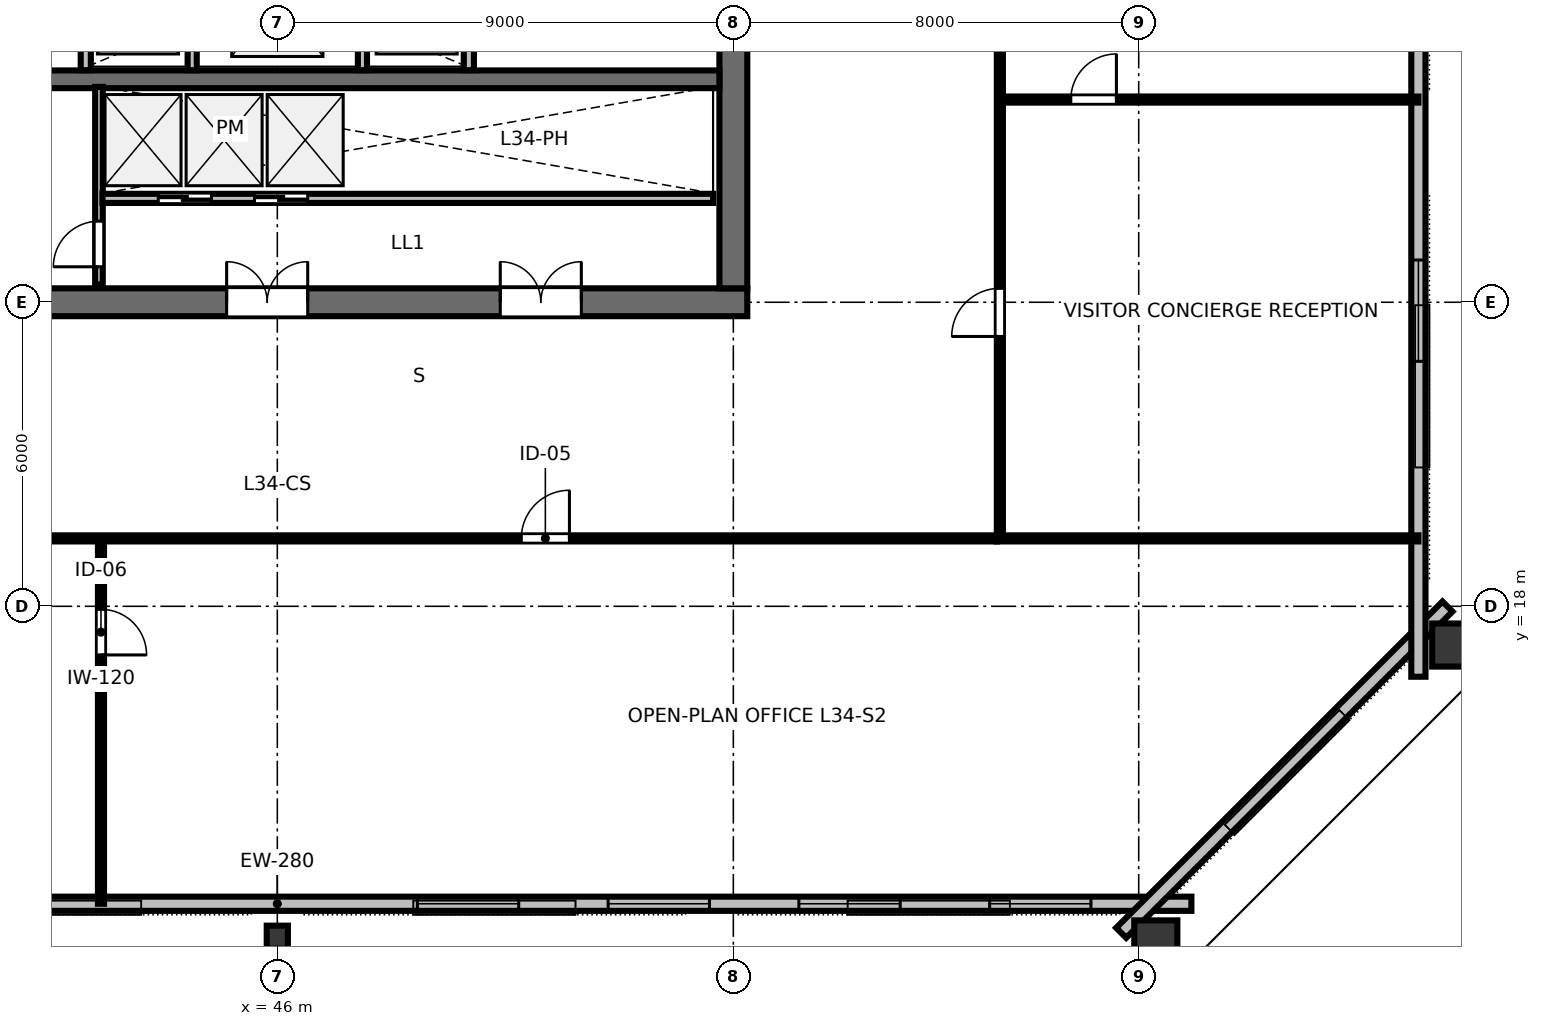
"""IFC4 building model, lengths in metres.
Left out: names, types, materials, properties, quantities, classifications, styles, units other than length and angle.
Written with IfcOpenShell. Run it as: python <this file> out.ifc"""

import sys

from ifc_helpers import new_model, si_unit, direction, frame, frame_2d, origin, origin_2d, place, context, subcontext, project, spatial, rectangle, hollow_rectangle, i_section, extrude, element, fill, save


model = new_model("IFC4")
c1 = context("Model", 3, precision=1e-05, world=origin(), true_north=direction((0.0, 1.0)))
c2 = subcontext(c1, "Body", "Model", "MODEL_VIEW")
j1 = project(units=[si_unit("LENGTHUNIT", "METRE"), si_unit("PLANEANGLEUNIT", "RADIAN")], contexts=[c1])
p1 = place(None, origin())
s1 = spatial("IfcSite", under=j1, at=p1, CompositionType="ELEMENT")
p2 = place(p1, origin())
s2 = spatial("IfcBuilding", under=s1, at=p2, CompositionType="ELEMENT")
p3 = place(p2, frame((0.0, 0.0, 131.2)))
s3 = spatial("IfcBuildingStorey", under=s2, at=p3, CompositionType="ELEMENT", Elevation=131.2)
p4 = place(p3, frame((36.725, 24.0, 0.0), z_axis=(0.0, 0.0, 1.0), x_axis=(1.0, 0.0, 0.0)))
e1 = element("IfcWall", 1, at=p4, inside=s3, PredefinedType="SHEAR", context=c2, shape_type="SweptSolid", body=[
    extrude(rectangle(XDim=18.55, YDim=0.55, at=frame_2d((9.275, 0.0))), origin(), (0.0, 0.0, 1.0), 3.36),
])
p5 = place(p4, frame((8.275, 0.0, 0.0)))
e2 = element("IfcOpeningElement", 2, at=p5, cuts=e1, PredefinedType="OPENING", context=c2, shape_type="SweptSolid", body=[
    extrude(rectangle(XDim=1.6, YDim=2.15, at=frame_2d((0.8, 1.075))), frame((0.0, 0.285, 0.0), z_axis=(0.0, -1.0, 0.0), x_axis=(1.0, 0.0, 0.0)), (0.0, 0.0, 1.0), 0.57),
])
p6 = place(p4, frame((13.675, 0.0, 0.0)))
e3 = element("IfcOpeningElement", 3, at=p6, cuts=e1, PredefinedType="OPENING", context=c2, shape_type="SweptSolid", body=[
    extrude(rectangle(XDim=1.6, YDim=2.15, at=frame_2d((0.8, 1.075))), frame((0.0, 0.285, 0.0), z_axis=(0.0, -1.0, 0.0), x_axis=(1.0, 0.0, 0.0)), (0.0, 0.0, 1.0), 0.57),
])
p7 = place(p3, frame((55.0, 24.275, 0.0), z_axis=(0.0, 0.0, 1.0), x_axis=(0.0, 1.0, 0.0)))
e4 = element("IfcWall", 4, at=p7, inside=s3, PredefinedType="SHEAR", context=c2, shape_type="SweptSolid", body=[
    extrude(rectangle(XDim=15.45, YDim=0.55, at=frame_2d((7.725, 0.0))), origin(), (0.0, 0.0, 1.0), 3.36),
])
p8 = place(p7, frame((5.25, 0.0, 0.0)))
e5 = element("IfcOpeningElement", 5, at=p8, cuts=e4, PredefinedType="OPENING", context=c2, shape_type="SweptSolid", body=[
    extrude(rectangle(XDim=1.15, YDim=2.15, at=frame_2d((0.575, 1.075))), frame((0.0, 0.285, 0.0), z_axis=(0.0, -1.0, 0.0), x_axis=(1.0, 0.0, 0.0)), (0.0, 0.0, 1.0), 0.57),
])
p9 = place(p3, frame((37.275, 28.4, 0.0), z_axis=(0.0, 0.0, 1.0), x_axis=(1.0, 0.0, 0.0)))
e6 = element("IfcWall", 6, at=p9, inside=s3, PredefinedType="SHEAR", context=c2, shape_type="SweptSolid", body=[
    extrude(rectangle(XDim=17.45, YDim=0.35, at=frame_2d((8.725, 0.0))), origin(), (0.0, 0.0, 1.0), 3.36),
])
p10 = place(p3, frame((46.0, 11.47, 0.0), z_axis=(0.0, 0.0, 1.0), x_axis=(1.0, 0.0, 0.0)))
e7 = element("IfcColumn", 7, at=p10, inside=s3, PredefinedType="COLUMN", context=c2, shape_type="SweptSolid", body=[
    extrude(i_section(OverallWidth=0.418, OverallDepth=0.455, WebThickness=0.042, FlangeThickness=0.068, FilletRadius=0.025, at=origin_2d()), origin(), (0.0, 0.0, 1.0), 3.358),
])
for number, where, z_axis, x_axis in (
    (8, (63.338, 11.302, 0.0), (0.0, 0.0, 1.0), (1.0, 0.0, 0.0)),
    (9, (69.292, 17.236, 0.0), (0.0, 0.0, 1.0), (0.0, 1.0, 0.0)),
):
    element("IfcColumn", number, at=place(p3, frame(where, z_axis=z_axis, x_axis=x_axis)), inside=s3, PredefinedType="COLUMN", context=c2, shape_type="SweptSolid", body=[
        extrude(hollow_rectangle(XDim=0.85, YDim=1.0, WallThickness=0.05, at=origin_2d()), origin(), (0.0, 0.0, 1.0), 3.358),
    ])
p11 = place(p3, frame((27.96, 12.13, 0.0), z_axis=(0.0, 0.0, 1.0), x_axis=(1.0, 0.0, 0.0)))
e10 = element("IfcWall", 10, at=p11, inside=s3, PredefinedType="STANDARD", context=c2, shape_type="SweptSolid", body=[
    extrude(rectangle(XDim=36.08, YDim=0.28, at=frame_2d((18.04, 0.0))), origin(), (0.0, 0.0, 1.0), 3.36),
])
p12 = place(p11, frame((1.982, 0.0, 0.8)))
e11 = element("IfcOpeningElement", 11, at=p12, cuts=e10, PredefinedType="OPENING", context=c2, shape_type="SweptSolid", body=[
    extrude(rectangle(XDim=2.0, YDim=1.95, at=frame_2d((1.0, 0.975))), frame((0.0, 0.15, 0.0), z_axis=(0.0, -1.0, 0.0), x_axis=(1.0, 0.0, 0.0)), (0.0, 0.0, 1.0), 0.3),
])
p13 = place(p11, frame((5.747, 0.0, 0.8)))
e12 = element("IfcOpeningElement", 12, at=p13, cuts=e10, PredefinedType="OPENING", context=c2, shape_type="SweptSolid", body=[
    extrude(rectangle(XDim=2.0, YDim=1.95, at=frame_2d((1.0, 0.975))), frame((0.0, 0.15, 0.0), z_axis=(0.0, -1.0, 0.0), x_axis=(1.0, 0.0, 0.0)), (0.0, 0.0, 1.0), 0.3),
])
p14 = place(p11, frame((9.511, 0.0, 0.8)))
e13 = element("IfcOpeningElement", 13, at=p14, cuts=e10, PredefinedType="OPENING", context=c2, shape_type="SweptSolid", body=[
    extrude(rectangle(XDim=2.0, YDim=1.95, at=frame_2d((1.0, 0.975))), frame((0.0, 0.15, 0.0), z_axis=(0.0, -1.0, 0.0), x_axis=(1.0, 0.0, 0.0)), (0.0, 0.0, 1.0), 0.3),
])
p15 = place(p11, frame((20.804, 0.0, 0.8)))
e14 = element("IfcOpeningElement", 14, at=p15, cuts=e10, PredefinedType="OPENING", context=c2, shape_type="SweptSolid", body=[
    extrude(rectangle(XDim=2.0, YDim=1.95, at=frame_2d((1.0, 0.975))), frame((0.0, 0.15, 0.0), z_axis=(0.0, -1.0, 0.0), x_axis=(1.0, 0.0, 0.0)), (0.0, 0.0, 1.0), 0.3),
])
p16 = place(p11, frame((24.569, 0.0, 0.8)))
e15 = element("IfcOpeningElement", 15, at=p16, cuts=e10, PredefinedType="OPENING", context=c2, shape_type="SweptSolid", body=[
    extrude(rectangle(XDim=2.0, YDim=1.95, at=frame_2d((1.0, 0.975))), frame((0.0, 0.15, 0.0), z_axis=(0.0, -1.0, 0.0), x_axis=(1.0, 0.0, 0.0)), (0.0, 0.0, 1.0), 0.3),
])
p17 = place(p11, frame((28.333, 0.0, 0.8)))
e16 = element("IfcOpeningElement", 16, at=p17, cuts=e10, PredefinedType="OPENING", context=c2, shape_type="SweptSolid", body=[
    extrude(rectangle(XDim=2.0, YDim=1.95, at=frame_2d((1.0, 0.975))), frame((0.0, 0.15, 0.0), z_axis=(0.0, -1.0, 0.0), x_axis=(1.0, 0.0, 0.0)), (0.0, 0.0, 1.0), 0.3),
])
p18 = place(p11, frame((32.098, 0.0, 0.8)))
e17 = element("IfcOpeningElement", 17, at=p18, cuts=e10, PredefinedType="OPENING", context=c2, shape_type="SweptSolid", body=[
    extrude(rectangle(XDim=2.0, YDim=1.95, at=frame_2d((1.0, 0.975))), frame((0.0, 0.15, 0.0), z_axis=(0.0, -1.0, 0.0), x_axis=(1.0, 0.0, 0.0)), (0.0, 0.0, 1.0), 0.3),
])
p19 = place(p3, frame((62.655, 11.556, 0.0), z_axis=(0.0, 0.0, 1.0), x_axis=(0.707106781187, 0.707106781187, 0.0)))
e18 = element("IfcWall", 18, at=p19, inside=s3, PredefinedType="STANDARD", context=c2, shape_type="SweptSolid", body=[
    extrude(rectangle(XDim=9.107, YDim=0.28, at=frame_2d((4.553, 0.0))), origin(), (0.0, 0.0, 1.0), 3.36),
])
p20 = place(p3, frame((68.52, 16.61, 0.0), z_axis=(0.0, 0.0, 1.0), x_axis=(0.0, 1.0, 0.0)))
e19 = element("IfcWall", 19, at=p20, inside=s3, PredefinedType="STANDARD", context=c2, shape_type="SweptSolid", body=[
    extrude(rectangle(XDim=30.78, YDim=0.28, at=frame_2d((15.39, 0.0))), origin(), (0.0, 0.0, 1.0), 3.36),
])
p21 = place(p20, frame((6.224, 0.0, 0.8)))
e20 = element("IfcOpeningElement", 20, at=p21, cuts=e19, PredefinedType="OPENING", context=c2, shape_type="SweptSolid", body=[
    extrude(rectangle(XDim=2.0, YDim=1.95, at=frame_2d((1.0, 0.975))), frame((0.0, 0.15, 0.0), z_axis=(0.0, -1.0, 0.0), x_axis=(1.0, 0.0, 0.0)), (0.0, 0.0, 1.0), 0.3),
])
p22 = place(p20, frame((18.473, 0.0, 0.8)))
e21 = element("IfcOpeningElement", 21, at=p22, cuts=e19, PredefinedType="OPENING", context=c2, shape_type="SweptSolid", body=[
    extrude(rectangle(XDim=2.0, YDim=1.95, at=frame_2d((1.0, 0.975))), frame((0.0, 0.15, 0.0), z_axis=(0.0, -1.0, 0.0), x_axis=(1.0, 0.0, 0.0)), (0.0, 0.0, 1.0), 0.3),
])
p23 = place(p20, frame((22.556, 0.0, 0.8)))
e22 = element("IfcOpeningElement", 22, at=p23, cuts=e19, PredefinedType="OPENING", context=c2, shape_type="SweptSolid", body=[
    extrude(rectangle(XDim=2.0, YDim=1.95, at=frame_2d((1.0, 0.975))), frame((0.0, 0.15, 0.0), z_axis=(0.0, -1.0, 0.0), x_axis=(1.0, 0.0, 0.0)), (0.0, 0.0, 1.0), 0.3),
])
p24 = place(p3, frame((42.22, 28.58, 0.0), z_axis=(0.0, 0.0, 1.0), x_axis=(0.0, 1.0, 0.0)))
e23 = element("IfcWall", 23, at=p24, inside=s3, PredefinedType="PARTITIONING", context=c2, shape_type="SweptSolid", body=[
    extrude(rectangle(XDim=3.04, YDim=0.2, at=frame_2d((1.52, 0.0))), origin(), (0.0, 0.0, 1.0), 3.36),
])
p25 = place(p24, frame((0.95, 0.0, 0.0)))
e24 = element("IfcOpeningElement", 24, at=p25, cuts=e23, PredefinedType="OPENING", context=c2, shape_type="SweptSolid", body=[
    extrude(rectangle(XDim=1.05, YDim=2.15, at=frame_2d((0.525, 1.075))), frame((0.0, 0.11, 0.0), z_axis=(0.0, -1.0, 0.0), x_axis=(1.0, 0.0, 0.0)), (0.0, 0.0, 1.0), 0.22),
])
p26 = place(p3, frame((49.78, 28.58, 0.0), z_axis=(0.0, 0.0, 1.0), x_axis=(0.0, 1.0, 0.0)))
e25 = element("IfcWall", 25, at=p26, inside=s3, PredefinedType="PARTITIONING", context=c2, shape_type="SweptSolid", body=[
    extrude(rectangle(XDim=3.04, YDim=0.2, at=frame_2d((1.52, 0.0))), origin(), (0.0, 0.0, 1.0), 3.36),
])
p27 = place(p26, frame((0.95, 0.0, 0.0)))
e26 = element("IfcOpeningElement", 26, at=p27, cuts=e25, PredefinedType="OPENING", context=c2, shape_type="SweptSolid", body=[
    extrude(rectangle(XDim=1.05, YDim=2.15, at=frame_2d((0.525, 1.075))), frame((0.0, 0.11, 0.0), z_axis=(0.0, -1.0, 0.0), x_axis=(1.0, 0.0, 0.0)), (0.0, 0.0, 1.0), 0.22),
])
for number, where, z_axis, x_axis in (
    (27, (44.32, 28.58, 0.0), (0.0, 0.0, 1.0), (0.0, 1.0, 0.0)),
    (28, (47.68, 28.58, 0.0), (0.0, 0.0, 1.0), (0.0, 1.0, 0.0)),
):
    element("IfcWall", number, at=place(p3, frame(where, z_axis=z_axis, x_axis=x_axis)), inside=s3, PredefinedType="PARTITIONING", context=c2, shape_type="SweptSolid", body=[
        extrude(rectangle(XDim=3.04, YDim=0.18, at=frame_2d((1.52, 0.0))), origin(), (0.0, 0.0, 1.0), 3.36),
    ])
p28 = place(p3, frame((42.48, 24.35, 0.0), z_axis=(0.0, 0.0, 1.0), x_axis=(0.0, 1.0, 0.0)))
e29 = element("IfcWall", 29, at=p28, inside=s3, PredefinedType="PARTITIONING", context=c2, shape_type="SweptSolid", body=[
    extrude(rectangle(XDim=3.9, YDim=0.15, at=frame_2d((1.95, 0.0))), origin(), (0.0, 0.0, 1.0), 3.36),
])
p29 = place(p28, frame((0.35, 0.0, 0.0)))
e30 = element("IfcOpeningElement", 30, at=p29, cuts=e29, PredefinedType="OPENING", context=c2, shape_type="SweptSolid", body=[
    extrude(rectangle(XDim=0.9, YDim=2.15, at=frame_2d((0.45, 1.075))), frame((0.0, 0.085, 0.0), z_axis=(0.0, -1.0, 0.0), x_axis=(1.0, 0.0, 0.0)), (0.0, 0.0, 1.0), 0.17),
])
p30 = place(p3, frame((42.55, 26.05, 0.0), z_axis=(0.0, 0.0, 1.0), x_axis=(1.0, 0.0, 0.0)))
e31 = element("IfcWall", 31, at=p30, inside=s3, PredefinedType="PARTITIONING", context=c2, shape_type="SweptSolid", body=[
    extrude(rectangle(XDim=12.05, YDim=0.18, at=frame_2d((6.025, 0.0))), origin(), (0.0, 0.0, 1.0), 3.36),
])
p31 = place(p30, frame((1.1, 0.0, 0.0)))
e32 = element("IfcOpeningElement", 32, at=p31, cuts=e31, PredefinedType="OPENING", context=c2, shape_type="SweptSolid", body=[
    extrude(rectangle(XDim=1.05, YDim=2.15, at=frame_2d((0.525, 1.075))), frame((0.0, 0.1, 0.0), z_axis=(0.0, -1.0, 0.0), x_axis=(1.0, 0.0, 0.0)), (0.0, 0.0, 1.0), 0.2),
])
p32 = place(p30, frame((3.0, 0.0, 0.0)))
e33 = element("IfcOpeningElement", 33, at=p32, cuts=e31, PredefinedType="OPENING", context=c2, shape_type="SweptSolid", body=[
    extrude(rectangle(XDim=1.05, YDim=2.15, at=frame_2d((0.525, 1.075))), frame((0.0, 0.1, 0.0), z_axis=(0.0, -1.0, 0.0), x_axis=(1.0, 0.0, 0.0)), (0.0, 0.0, 1.0), 0.2),
])
p33 = place(p3, frame((42.52, 19.34, 0.0), z_axis=(0.0, 0.0, 1.0), x_axis=(0.0, -1.0, 0.0)))
e34 = element("IfcWall", 34, at=p33, inside=s3, PredefinedType="PARTITIONING", context=c2, shape_type="SweptSolid", body=[
    extrude(rectangle(XDim=7.21, YDim=0.12, at=frame_2d((3.605, 0.0))), origin(), (0.0, 0.0, 1.0), 2.64),
])
p34 = place(p33, frame((1.4, 0.0, 0.0)))
e35 = element("IfcOpeningElement", 35, at=p34, cuts=e34, PredefinedType="OPENING", context=c2, shape_type="SweptSolid", body=[
    extrude(rectangle(XDim=0.9, YDim=2.15, at=frame_2d((0.45, 1.075))), frame((0.0, 0.07, 0.0), z_axis=(0.0, -1.0, 0.0), x_axis=(1.0, 0.0, 0.0)), (0.0, 0.0, 1.0), 0.14),
])
p35 = place(p3, frame((31.8, 19.34, 0.0), z_axis=(0.0, 0.0, 1.0), x_axis=(1.0, 0.0, 0.0)))
e36 = element("IfcWall", 36, at=p35, inside=s3, PredefinedType="PARTITIONING", context=c2, shape_type="SweptSolid", body=[
    extrude(rectangle(XDim=28.4, YDim=0.12, at=frame_2d((14.2, 0.0))), origin(), (0.0, 0.0, 1.0), 2.64),
])
p36 = place(p35, frame((4.955, 0.0, 0.0)))
e37 = element("IfcOpeningElement", 37, at=p36, cuts=e36, PredefinedType="OPENING", context=c2, shape_type="SweptSolid", body=[
    extrude(rectangle(XDim=0.95, YDim=2.15, at=frame_2d((0.475, 1.075))), frame((0.0, 0.07, 0.0), z_axis=(0.0, -1.0, 0.0), x_axis=(1.0, 0.0, 0.0)), (0.0, 0.0, 1.0), 0.14),
])
p37 = place(p35, frame((19.015, 0.0, 0.0)))
e38 = element("IfcOpeningElement", 38, at=p37, cuts=e36, PredefinedType="OPENING", context=c2, shape_type="SweptSolid", body=[
    extrude(rectangle(XDim=0.95, YDim=2.15, at=frame_2d((0.475, 1.075))), frame((0.0, 0.07, 0.0), z_axis=(0.0, -1.0, 0.0), x_axis=(1.0, 0.0, 0.0)), (0.0, 0.0, 1.0), 0.14),
])
p38 = place(p3, frame((60.26, 28.0, 0.0), z_axis=(0.0, 0.0, 1.0), x_axis=(1.0, 0.0, 0.0)))
e39 = element("IfcWall", 39, at=p38, inside=s3, PredefinedType="PARTITIONING", context=c2, shape_type="SweptSolid", body=[
    extrude(rectangle(XDim=8.26, YDim=0.12, at=frame_2d((4.13, 0.0))), origin(), (0.0, 0.0, 1.0), 2.64),
])
p39 = place(p38, frame((1.4, 0.0, 0.0)))
e40 = element("IfcOpeningElement", 40, at=p39, cuts=e39, PredefinedType="OPENING", context=c2, shape_type="SweptSolid", body=[
    extrude(rectangle(XDim=0.9, YDim=2.15, at=frame_2d((0.45, 1.075))), frame((0.0, 0.07, 0.0), z_axis=(0.0, -1.0, 0.0), x_axis=(1.0, 0.0, 0.0)), (0.0, 0.0, 1.0), 0.14),
])
p40 = place(p3, frame((60.26, 19.4, 0.0), z_axis=(0.0, 0.0, 1.0), x_axis=(0.0, 1.0, 0.0)))
e41 = element("IfcWall", 41, at=p40, inside=s3, PredefinedType="PARTITIONING", context=c2, shape_type="SweptSolid", body=[
    extrude(rectangle(XDim=11.58, YDim=0.12, at=frame_2d((5.79, 0.0))), origin(), (0.0, 0.0, 1.0), 2.64),
])
p41 = place(p40, frame((3.925, 0.0, 0.0)))
e42 = element("IfcOpeningElement", 42, at=p41, cuts=e41, PredefinedType="OPENING", context=c2, shape_type="SweptSolid", body=[
    extrude(rectangle(XDim=0.95, YDim=2.15, at=frame_2d((0.475, 1.075))), frame((0.0, 0.07, 0.0), z_axis=(0.0, -1.0, 0.0), x_axis=(1.0, 0.0, 0.0)), (0.0, 0.0, 1.0), 0.14),
])
p42 = place(p40, frame((9.615, 0.0, 0.0)))
e43 = element("IfcOpeningElement", 43, at=p42, cuts=e41, PredefinedType="OPENING", context=c2, shape_type="SweptSolid", body=[
    extrude(rectangle(XDim=0.95, YDim=2.15, at=frame_2d((0.475, 1.075))), frame((0.0, 0.07, 0.0), z_axis=(0.0, -1.0, 0.0), x_axis=(1.0, 0.0, 0.0)), (0.0, 0.0, 1.0), 0.14),
])
p43 = place(p3, frame((60.2, 19.34, 0.0), z_axis=(0.0, 0.0, 1.0), x_axis=(1.0, 0.0, 0.0)))
e44 = element("IfcWall", 44, at=p43, inside=s3, PredefinedType="PARTITIONING", context=c2, shape_type="SweptSolid", body=[
    extrude(rectangle(XDim=8.32, YDim=0.12, at=frame_2d((4.16, 0.0))), origin(), (0.0, 0.0, 1.0), 2.64),
])
p44 = place(p15, origin())
e45 = element("IfcWindow", 45, at=p44, inside=s3, PartitioningType="SINGLE_PANEL", PredefinedType="WINDOW", context=c2, shape_type="SweptSolid", body=[
    extrude(rectangle(XDim=2.0, YDim=1.95, at=frame_2d((1.0, 0.975))), frame((0.0, 0.03, 0.0), z_axis=(0.0, -1.0, 0.0), x_axis=(1.0, 0.0, 0.0)), (0.0, 0.0, 1.0), 0.06),
])
fill(e14, e45)
p45 = place(p16, origin())
e46 = element("IfcWindow", 46, at=p45, inside=s3, PartitioningType="SINGLE_PANEL", PredefinedType="WINDOW", context=c2, shape_type="SweptSolid", body=[
    extrude(rectangle(XDim=2.0, YDim=1.95, at=frame_2d((1.0, 0.975))), frame((0.0, 0.03, 0.0), z_axis=(0.0, -1.0, 0.0), x_axis=(1.0, 0.0, 0.0)), (0.0, 0.0, 1.0), 0.06),
])
fill(e15, e46)
p46 = place(p17, origin())
e47 = element("IfcWindow", 47, at=p46, inside=s3, PartitioningType="SINGLE_PANEL", PredefinedType="WINDOW", context=c2, shape_type="SweptSolid", body=[
    extrude(rectangle(XDim=2.0, YDim=1.95, at=frame_2d((1.0, 0.975))), frame((0.0, 0.03, 0.0), z_axis=(0.0, -1.0, 0.0), x_axis=(1.0, 0.0, 0.0)), (0.0, 0.0, 1.0), 0.06),
])
fill(e16, e47)
p47 = place(p18, origin())
e48 = element("IfcWindow", 48, at=p47, inside=s3, PartitioningType="SINGLE_PANEL", PredefinedType="WINDOW", context=c2, shape_type="SweptSolid", body=[
    extrude(rectangle(XDim=2.0, YDim=1.95, at=frame_2d((1.0, 0.975))), frame((0.0, 0.03, 0.0), z_axis=(0.0, -1.0, 0.0), x_axis=(1.0, 0.0, 0.0)), (0.0, 0.0, 1.0), 0.06),
])
fill(e17, e48)
p48 = place(p21, origin())
e49 = element("IfcWindow", 49, at=p48, inside=s3, PartitioningType="SINGLE_PANEL", PredefinedType="WINDOW", context=c2, shape_type="SweptSolid", body=[
    extrude(rectangle(XDim=2.0, YDim=1.95, at=frame_2d((1.0, 0.975))), frame((0.0, 0.03, 0.0), z_axis=(0.0, -1.0, 0.0), x_axis=(1.0, 0.0, 0.0)), (0.0, 0.0, 1.0), 0.06),
])
fill(e20, e49)
p49 = place(p5, origin())
e50 = element("IfcDoor", 50, at=p49, inside=s3, OperationType="DOUBLE_DOOR_SINGLE_SWING", PredefinedType="DOOR", context=c2, shape_type="SweptSolid", body=[
    extrude(rectangle(XDim=1.6, YDim=2.15, at=frame_2d((0.8, 1.075))), frame((0.0, 0.025, 0.0), z_axis=(0.0, -1.0, 0.0), x_axis=(1.0, 0.0, 0.0)), (0.0, 0.0, 1.0), 0.05),
])
fill(e2, e50)
p50 = place(p6, origin())
e51 = element("IfcDoor", 51, at=p50, inside=s3, OperationType="DOUBLE_DOOR_SINGLE_SWING", PredefinedType="DOOR", context=c2, shape_type="SweptSolid", body=[
    extrude(rectangle(XDim=1.6, YDim=2.15, at=frame_2d((0.8, 1.075))), frame((0.0, 0.025, 0.0), z_axis=(0.0, -1.0, 0.0), x_axis=(1.0, 0.0, 0.0)), (0.0, 0.0, 1.0), 0.05),
])
fill(e3, e51)
p51 = place(p29, origin())
e52 = element("IfcDoor", 52, at=p51, inside=s3, OperationType="SINGLE_SWING_LEFT", PredefinedType="DOOR", context=c2, shape_type="SweptSolid", body=[
    extrude(rectangle(XDim=0.9, YDim=2.15, at=frame_2d((0.45, 1.075))), frame((0.0, 0.025, 0.0), z_axis=(0.0, -1.0, 0.0), x_axis=(1.0, 0.0, 0.0)), (0.0, 0.0, 1.0), 0.05),
])
fill(e30, e52)
p52 = place(p31, origin())
e53 = element("IfcDoor", 53, at=p52, inside=s3, OperationType="SLIDING_TO_LEFT", PredefinedType="DOOR", context=c2, shape_type="SweptSolid", body=[
    extrude(rectangle(XDim=1.05, YDim=2.15, at=frame_2d((0.525, 1.075))), frame((0.0, 0.025, 0.0), z_axis=(0.0, -1.0, 0.0), x_axis=(1.0, 0.0, 0.0)), (0.0, 0.0, 1.0), 0.05),
])
fill(e32, e53)
p53 = place(p32, origin())
e54 = element("IfcDoor", 54, at=p53, inside=s3, OperationType="SLIDING_TO_RIGHT", PredefinedType="DOOR", context=c2, shape_type="SweptSolid", body=[
    extrude(rectangle(XDim=1.05, YDim=2.15, at=frame_2d((0.525, 1.075))), frame((0.0, 0.025, 0.0), z_axis=(0.0, -1.0, 0.0), x_axis=(1.0, 0.0, 0.0)), (0.0, 0.0, 1.0), 0.05),
])
fill(e33, e54)
p54 = place(p34, origin())
e55 = element("IfcDoor", 55, at=p54, inside=s3, OperationType="SINGLE_SWING_RIGHT", PredefinedType="DOOR", context=c2, shape_type="SweptSolid", body=[
    extrude(rectangle(XDim=0.9, YDim=2.15, at=frame_2d((0.45, 1.075))), frame((0.0, 0.025, 0.0), z_axis=(0.0, -1.0, 0.0), x_axis=(1.0, 0.0, 0.0)), (0.0, 0.0, 1.0), 0.05),
])
fill(e35, e55)
p55 = place(p37, origin())
e56 = element("IfcDoor", 56, at=p55, inside=s3, OperationType="SINGLE_SWING_RIGHT", PredefinedType="DOOR", context=c2, shape_type="SweptSolid", body=[
    extrude(rectangle(XDim=0.95, YDim=2.15, at=frame_2d((0.475, 1.075))), frame((0.0, 0.025, 0.0), z_axis=(0.0, -1.0, 0.0), x_axis=(1.0, 0.0, 0.0)), (0.0, 0.0, 1.0), 0.05),
])
fill(e38, e56)
p56 = place(p39, origin())
e57 = element("IfcDoor", 57, at=p56, inside=s3, OperationType="SINGLE_SWING_RIGHT", PredefinedType="DOOR", context=c2, shape_type="SweptSolid", body=[
    extrude(rectangle(XDim=0.9, YDim=2.15, at=frame_2d((0.45, 1.075))), frame((0.0, 0.025, 0.0), z_axis=(0.0, -1.0, 0.0), x_axis=(1.0, 0.0, 0.0)), (0.0, 0.0, 1.0), 0.05),
])
fill(e40, e57)
p57 = place(p41, origin())
e58 = element("IfcDoor", 58, at=p57, inside=s3, OperationType="SINGLE_SWING_LEFT", PredefinedType="DOOR", context=c2, shape_type="SweptSolid", body=[
    extrude(rectangle(XDim=0.95, YDim=2.15, at=frame_2d((0.475, 1.075))), frame((0.0, 0.025, 0.0), z_axis=(0.0, -1.0, 0.0), x_axis=(1.0, 0.0, 0.0)), (0.0, 0.0, 1.0), 0.05),
])
fill(e42, e58)
save(model, sys.argv[1])
